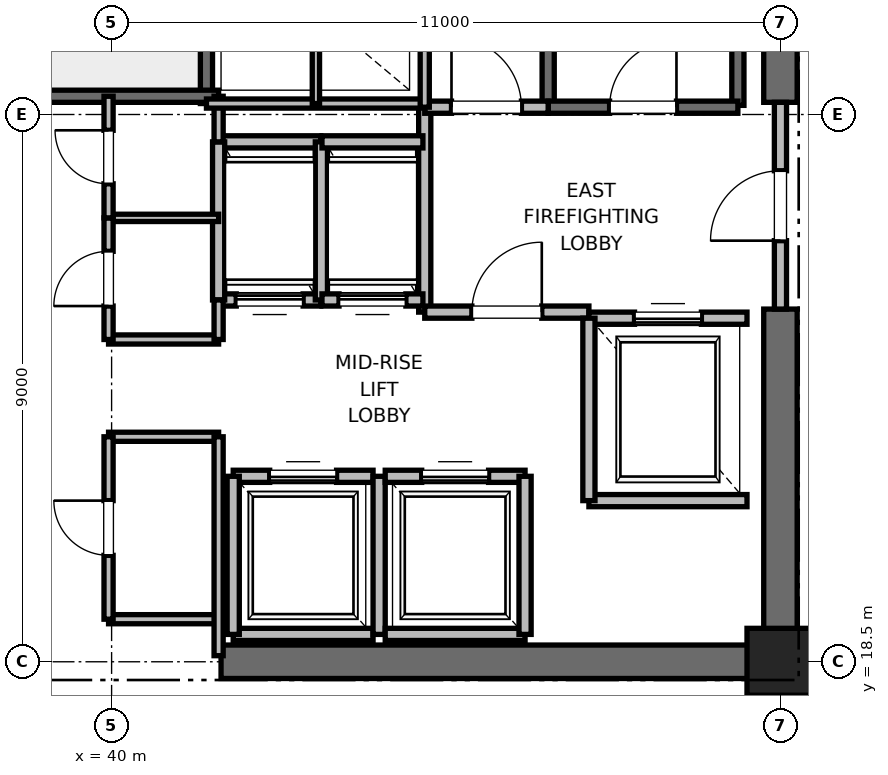
"""IFC4 building model, lengths in metres.
Left out: names, types, materials, properties, quantities, classifications, styles, units other than length and angle.
Written with IfcOpenShell. Run it as: python <this file> out.ifc"""

import sys

from ifc_helpers import new_model, si_unit, direction, frame, frame_2d, origin, origin_2d, place, context, subcontext, project, spatial, rectangle, extrude, element, fill, save


model = new_model("IFC4")
c1 = context("Model", 3, precision=1e-05, world=origin(), true_north=direction((0.0, 1.0)))
c2 = subcontext(c1, "Body", "Model", "MODEL_VIEW")
j1 = project(units=[si_unit("LENGTHUNIT", "METRE"), si_unit("PLANEANGLEUNIT", "RADIAN")], contexts=[c1])
p1 = place(None, origin())
s1 = spatial("IfcSite", under=j1, at=p1, CompositionType="ELEMENT")
p2 = place(p1, origin())
s2 = spatial("IfcBuilding", under=s1, at=p2, CompositionType="ELEMENT")
p3 = place(p2, frame((0.0, 0.0, 156.4)))
s3 = spatial("IfcBuildingStorey", under=s2, at=p3, CompositionType="ELEMENT", Elevation=156.4)
p4 = place(p3, frame((51.0, 18.5, 0.0), z_axis=(0.0, 0.0, 1.0), x_axis=(1.0, 0.0, 0.0)))
e1 = element("IfcColumn", 1, at=p4, inside=s3, PredefinedType="PILASTER", context=c2, shape_type="SweptSolid", body=[
    extrude(rectangle(XDim=1.1, YDim=1.1, at=origin_2d()), origin(), (0.0, 0.0, 1.0), 4.0),
])
p5 = place(p3, frame((41.8, 18.5, 0.0), z_axis=(0.0, 0.0, 1.0), x_axis=(1.0, 0.0, 0.0)))
e2 = element("IfcWall", 2, at=p5, inside=s3, PredefinedType="SHEAR", context=c2, shape_type="SweptSolid", body=[
    extrude(rectangle(XDim=9.2, YDim=0.55, at=frame_2d((4.6, 0.0))), origin(), (0.0, 0.0, 1.0), 3.775),
])
p6 = place(p3, frame((51.0, 18.5, 0.0), z_axis=(0.0, 0.0, 1.0), x_axis=(0.0, 1.0, 0.0)))
e3 = element("IfcWall", 3, at=p6, inside=s3, PredefinedType="SHEAR", context=c2, shape_type="SweptSolid", body=[
    extrude(rectangle(XDim=5.8, YDim=0.55, at=frame_2d((2.9, 0.0))), origin(), (0.0, 0.0, 1.0), 3.775),
])
p7 = place(p3, frame((51.0, 27.7, 0.0), z_axis=(0.0, 0.0, 1.0), x_axis=(0.0, 1.0, 0.0)))
e4 = element("IfcWall", 4, at=p7, inside=s3, PredefinedType="SHEAR", context=c2, shape_type="SweptSolid", body=[
    extrude(rectangle(XDim=8.8, YDim=0.55, at=frame_2d((4.4, 0.0))), origin(), (0.0, 0.0, 1.0), 3.775),
])
p8 = place(p3, frame((50.3, 27.65, 0.0), z_axis=(0.0, 0.0, 1.0), x_axis=(0.0, 1.0, 0.0)))
e5 = element("IfcWall", 5, at=p8, inside=s3, PredefinedType="SOLIDWALL", context=c2, shape_type="SweptSolid", body=[
    extrude(rectangle(XDim=8.15, YDim=0.2, at=frame_2d((4.075, 0.0))), origin(), (0.0, 0.0, 1.0), 3.775),
])
p9 = place(p3, frame((47.18, 27.62, 0.0), z_axis=(0.0, 0.0, 1.0), x_axis=(0.0, 1.0, 0.0)))
e6 = element("IfcWall", 6, at=p9, inside=s3, PredefinedType="SOLIDWALL", context=c2, shape_type="SweptSolid", body=[
    extrude(rectangle(XDim=8.18, YDim=0.2, at=frame_2d((4.09, 0.0))), origin(), (0.0, 0.0, 1.0), 3.775),
])
p10 = place(p3, frame((47.18, 27.62, 0.0), z_axis=(0.0, 0.0, 1.0), x_axis=(1.0, 0.0, 0.0)))
e7 = element("IfcWall", 7, at=p10, inside=s3, PredefinedType="SOLIDWALL", context=c2, shape_type="SweptSolid", body=[
    extrude(rectangle(XDim=3.12, YDim=0.2, at=frame_2d((1.56, 0.0))), origin(), (0.0, 0.0, 1.0), 3.775),
])
p11 = place(p10, frame((1.01, 0.0, 0.0)))
e8 = element("IfcOpeningElement", 8, at=p11, cuts=e7, PredefinedType="OPENING", context=c2, shape_type="SweptSolid", body=[
    extrude(rectangle(XDim=1.1, YDim=2.15, at=frame_2d((0.55, 1.075))), frame((0.0, 0.1, 0.0), z_axis=(0.0, -1.0, 0.0), x_axis=(1.0, 0.0, 0.0)), (0.0, 0.0, 1.0), 0.2),
])
p12 = place(p3, frame((41.56, 27.68, 0.0), z_axis=(0.0, 0.0, 1.0), x_axis=(0.0, 1.0, 0.0)))
e9 = element("IfcWall", 9, at=p12, inside=s3, PredefinedType="SOLIDWALL", context=c2, shape_type="SweptSolid", body=[
    extrude(rectangle(XDim=8.57, YDim=0.2, at=frame_2d((4.285, 0.0))), origin(), (0.0, 0.0, 1.0), 3.775),
])
p13 = place(p3, frame((38.44, 27.8, 0.0), z_axis=(0.0, 0.0, 1.0), x_axis=(1.0, 0.0, 0.0)))
e10 = element("IfcWall", 10, at=p13, inside=s3, PredefinedType="SOLIDWALL", context=c2, shape_type="SweptSolid", body=[
    extrude(rectangle(XDim=3.32, YDim=0.2, at=frame_2d((1.66, 0.0))), origin(), (0.0, 0.0, 1.0), 3.775),
])
p14 = place(p3, frame((45.15, 24.25, 0.0), z_axis=(0.0, 0.0, 1.0), x_axis=(0.0, 1.0, 0.0)))
e11 = element("IfcWall", 11, at=p14, inside=s3, PredefinedType="PARTITIONING", context=c2, shape_type="SweptSolid", body=[
    extrude(rectangle(XDim=3.37, YDim=0.2, at=frame_2d((1.685, 0.0))), origin(), (0.0, 0.0, 1.0), 3.775),
])
p15 = place(p3, frame((45.15, 24.25, 0.0), z_axis=(0.0, 0.0, 1.0), x_axis=(1.0, 0.0, 0.0)))
e12 = element("IfcWall", 12, at=p15, inside=s3, PredefinedType="PARTITIONING", context=c2, shape_type="SweptSolid", body=[
    extrude(rectangle(XDim=2.7, YDim=0.2, at=frame_2d((1.35, 0.0))), origin(), (0.0, 0.0, 1.0), 3.775),
])
p16 = place(p15, frame((0.775, 0.0, 0.0)))
e13 = element("IfcOpeningElement", 13, at=p16, cuts=e12, PredefinedType="OPENING", context=c2, shape_type="SweptSolid", body=[
    extrude(rectangle(XDim=1.15, YDim=2.2, at=frame_2d((0.575, 1.1))), frame((0.0, 0.1, 0.0), z_axis=(0.0, -1.0, 0.0), x_axis=(1.0, 0.0, 0.0)), (0.0, 0.0, 1.0), 0.2),
])
p17 = place(p3, frame((45.15, 27.62, 0.0), z_axis=(0.0, 0.0, 1.0), x_axis=(1.0, 0.0, 0.0)))
e14 = element("IfcWall", 14, at=p17, inside=s3, PredefinedType="PARTITIONING", context=c2, shape_type="SweptSolid", body=[
    extrude(rectangle(XDim=2.03, YDim=0.2, at=frame_2d((1.015, 0.0))), origin(), (0.0, 0.0, 1.0), 3.775),
])
p18 = place(p17, frame((0.44, 0.0, 0.0)))
e15 = element("IfcOpeningElement", 15, at=p18, cuts=e14, PredefinedType="OPENING", context=c2, shape_type="SweptSolid", body=[
    extrude(rectangle(XDim=1.15, YDim=2.2, at=frame_2d((0.575, 1.1))), frame((0.0, 0.1, 0.0), z_axis=(0.0, -1.0, 0.0), x_axis=(1.0, 0.0, 0.0)), (0.0, 0.0, 1.0), 0.2),
])
p19 = place(p3, frame((51.0, 24.3, 0.0), z_axis=(0.0, 0.0, 1.0), x_axis=(0.0, 1.0, 0.0)))
e16 = element("IfcWall", 16, at=p19, inside=s3, PredefinedType="PARTITIONING", context=c2, shape_type="SweptSolid", body=[
    extrude(rectangle(XDim=3.4, YDim=0.2, at=frame_2d((1.7, 0.0))), origin(), (0.0, 0.0, 1.0), 2.755),
])
p20 = place(p19, frame((1.125, 0.0, 0.0)))
e17 = element("IfcOpeningElement", 17, at=p20, cuts=e16, PredefinedType="OPENING", context=c2, shape_type="SweptSolid", body=[
    extrude(rectangle(XDim=1.15, YDim=2.2, at=frame_2d((0.575, 1.1))), frame((0.0, 0.1, 0.0), z_axis=(0.0, -1.0, 0.0), x_axis=(1.0, 0.0, 0.0)), (0.0, 0.0, 1.0), 0.2),
])
p21 = place(p3, frame((47.85, 21.15, 0.0), z_axis=(0.0, 0.0, 1.0), x_axis=(1.0, 0.0, 0.0)))
e18 = element("IfcWall", 18, at=p21, inside=s3, PredefinedType="SOLIDWALL", context=c2, shape_type="SweptSolid", body=[
    extrude(rectangle(XDim=2.6, YDim=0.2, at=frame_2d((1.3, 0.0))), origin(), (0.0, 0.0, 1.0), 3.775),
])
p22 = place(p3, frame((50.45, 24.15, 0.0), z_axis=(0.0, 0.0, 1.0), x_axis=(-1.0, 0.0, 0.0)))
e19 = element("IfcWall", 19, at=p22, inside=s3, PredefinedType="SOLIDWALL", context=c2, shape_type="SweptSolid", body=[
    extrude(rectangle(XDim=2.6, YDim=0.2, at=frame_2d((1.3, 0.0))), origin(), (0.0, 0.0, 1.0), 2.755),
])
p23 = place(p22, frame((0.75, 0.0, 0.0)))
e20 = element("IfcOpeningElement", 20, at=p23, cuts=e19, PredefinedType="OPENING", context=c2, shape_type="SweptSolid", body=[
    extrude(rectangle(XDim=1.1, YDim=2.2, at=frame_2d((0.55, 1.1))), frame((0.0, 0.1, 0.0), z_axis=(0.0, -1.0, 0.0), x_axis=(1.0, 0.0, 0.0)), (0.0, 0.0, 1.0), 0.2),
])
p24 = place(p3, frame((47.85, 24.15, 0.0), z_axis=(0.0, 0.0, 1.0), x_axis=(0.0, -1.0, 0.0)))
e21 = element("IfcWall", 21, at=p24, inside=s3, PredefinedType="SOLIDWALL", context=c2, shape_type="SweptSolid", body=[
    extrude(rectangle(XDim=3.0, YDim=0.2, at=frame_2d((1.5, 0.0))), origin(), (0.0, 0.0, 1.0), 3.775),
])
p25 = place(p3, frame((42.0, 18.95, 0.0), z_axis=(0.0, 0.0, 1.0), x_axis=(1.0, 0.0, 0.0)))
e22 = element("IfcWall", 22, at=p25, inside=s3, PredefinedType="SOLIDWALL", context=c2, shape_type="SweptSolid", body=[
    extrude(rectangle(XDim=2.3, YDim=0.2, at=frame_2d((1.15, 0.0))), origin(), (0.0, 0.0, 1.0), 2.755),
])
p26 = place(p3, frame((44.3, 21.55, 0.0), z_axis=(0.0, 0.0, 1.0), x_axis=(-1.0, 0.0, 0.0)))
e23 = element("IfcWall", 23, at=p26, inside=s3, PredefinedType="SOLIDWALL", context=c2, shape_type="SweptSolid", body=[
    extrude(rectangle(XDim=2.3, YDim=0.2, at=frame_2d((1.15, 0.0))), origin(), (0.0, 0.0, 1.0), 3.775),
])
p27 = place(p26, frame((0.6, 0.0, 0.0)))
e24 = element("IfcOpeningElement", 24, at=p27, cuts=e23, PredefinedType="OPENING", context=c2, shape_type="SweptSolid", body=[
    extrude(rectangle(XDim=1.1, YDim=2.2, at=frame_2d((0.55, 1.1))), frame((0.0, 0.1, 0.0), z_axis=(0.0, -1.0, 0.0), x_axis=(1.0, 0.0, 0.0)), (0.0, 0.0, 1.0), 0.2),
])
p28 = place(p3, frame((42.0, 21.55, 0.0), z_axis=(0.0, 0.0, 1.0), x_axis=(0.0, -1.0, 0.0)))
e25 = element("IfcWall", 25, at=p28, inside=s3, PredefinedType="SOLIDWALL", context=c2, shape_type="SweptSolid", body=[
    extrude(rectangle(XDim=2.6, YDim=0.2, at=frame_2d((1.3, 0.0))), origin(), (0.0, 0.0, 1.0), 2.755),
])
p29 = place(p3, frame((44.4, 18.95, 0.0), z_axis=(0.0, 0.0, 1.0), x_axis=(0.0, 1.0, 0.0)))
e26 = element("IfcWall", 26, at=p29, inside=s3, PredefinedType="SOLIDWALL", context=c2, shape_type="SweptSolid", body=[
    extrude(rectangle(XDim=2.6, YDim=0.2, at=frame_2d((1.3, 0.0))), origin(), (0.0, 0.0, 1.0), 3.775),
])
p30 = place(p3, frame((44.5, 18.95, 0.0), z_axis=(0.0, 0.0, 1.0), x_axis=(1.0, 0.0, 0.0)))
e27 = element("IfcWall", 27, at=p30, inside=s3, PredefinedType="SOLIDWALL", context=c2, shape_type="SweptSolid", body=[
    extrude(rectangle(XDim=2.3, YDim=0.2, at=frame_2d((1.15, 0.0))), origin(), (0.0, 0.0, 1.0), 3.775),
])
p31 = place(p3, frame((46.8, 21.55, 0.0), z_axis=(0.0, 0.0, 1.0), x_axis=(-1.0, 0.0, 0.0)))
e28 = element("IfcWall", 28, at=p31, inside=s3, PredefinedType="SOLIDWALL", context=c2, shape_type="SweptSolid", body=[
    extrude(rectangle(XDim=2.3, YDim=0.2, at=frame_2d((1.15, 0.0))), origin(), (0.0, 0.0, 1.0), 3.775),
])
p32 = place(p31, frame((0.6, 0.0, 0.0)))
e29 = element("IfcOpeningElement", 29, at=p32, cuts=e28, PredefinedType="OPENING", context=c2, shape_type="SweptSolid", body=[
    extrude(rectangle(XDim=1.1, YDim=2.2, at=frame_2d((0.55, 1.1))), frame((0.0, 0.1, 0.0), z_axis=(0.0, -1.0, 0.0), x_axis=(1.0, 0.0, 0.0)), (0.0, 0.0, 1.0), 0.2),
])
p33 = place(p3, frame((46.8, 18.95, 0.0), z_axis=(0.0, 0.0, 1.0), x_axis=(0.0, 1.0, 0.0)))
e30 = element("IfcWall", 30, at=p33, inside=s3, PredefinedType="SOLIDWALL", context=c2, shape_type="SweptSolid", body=[
    extrude(rectangle(XDim=2.6, YDim=0.2, at=frame_2d((1.3, 0.0))), origin(), (0.0, 0.0, 1.0), 3.775),
])
p34 = place(p3, frame((41.76, 24.45, 0.0), z_axis=(0.0, 0.0, 1.0), x_axis=(1.0, 0.0, 0.0)))
e31 = element("IfcWall", 31, at=p34, inside=s3, PredefinedType="SOLIDWALL", context=c2, shape_type="SweptSolid", body=[
    extrude(rectangle(XDim=1.68, YDim=0.2, at=frame_2d((0.84, 0.0))), origin(), (0.0, 0.0, 1.0), 3.775),
])
p35 = place(p34, frame((0.29, 0.0, 0.0)))
e32 = element("IfcOpeningElement", 32, at=p35, cuts=e31, PredefinedType="OPENING", context=c2, shape_type="SweptSolid", body=[
    extrude(rectangle(XDim=1.1, YDim=2.2, at=frame_2d((0.55, 1.1))), frame((0.0, 0.1, 0.0), z_axis=(0.0, -1.0, 0.0), x_axis=(1.0, 0.0, 0.0)), (0.0, 0.0, 1.0), 0.2),
])
p36 = place(p3, frame((43.44, 27.05, 0.0), z_axis=(0.0, 0.0, 1.0), x_axis=(-1.0, 0.0, 0.0)))
e33 = element("IfcWall", 33, at=p36, inside=s3, PredefinedType="SOLIDWALL", context=c2, shape_type="SweptSolid", body=[
    extrude(rectangle(XDim=1.68, YDim=0.2, at=frame_2d((0.84, 0.0))), origin(), (0.0, 0.0, 1.0), 3.775),
])
for number, where, z_axis, x_axis in (
    (34, (41.76, 27.05, 0.0), (0.0, 0.0, 1.0), (0.0, -1.0, 0.0)),
    (35, (43.45, 24.45, 0.0), (0.0, 0.0, 1.0), (0.0, 1.0, 0.0)),
):
    element("IfcWall", number, at=place(p3, frame(where, z_axis=z_axis, x_axis=x_axis)), inside=s3, PredefinedType="SOLIDWALL", context=c2, shape_type="SweptSolid", body=[
        extrude(rectangle(XDim=2.6, YDim=0.2, at=frame_2d((1.3, 0.0))), origin(), (0.0, 0.0, 1.0), 3.775),
    ])
p37 = place(p3, frame((43.46, 24.45, 0.0), z_axis=(0.0, 0.0, 1.0), x_axis=(1.0, 0.0, 0.0)))
e36 = element("IfcWall", 36, at=p37, inside=s3, PredefinedType="SOLIDWALL", context=c2, shape_type="SweptSolid", body=[
    extrude(rectangle(XDim=1.66, YDim=0.2, at=frame_2d((0.83, 0.0))), origin(), (0.0, 0.0, 1.0), 3.775),
])
p38 = place(p37, frame((0.28, 0.0, 0.0)))
e37 = element("IfcOpeningElement", 37, at=p38, cuts=e36, PredefinedType="OPENING", context=c2, shape_type="SweptSolid", body=[
    extrude(rectangle(XDim=1.1, YDim=2.2, at=frame_2d((0.55, 1.1))), frame((0.0, 0.1, 0.0), z_axis=(0.0, -1.0, 0.0), x_axis=(1.0, 0.0, 0.0)), (0.0, 0.0, 1.0), 0.2),
])
p39 = place(p3, frame((45.12, 27.05, 0.0), z_axis=(0.0, 0.0, 1.0), x_axis=(-1.0, 0.0, 0.0)))
e38 = element("IfcWall", 38, at=p39, inside=s3, PredefinedType="SOLIDWALL", context=c2, shape_type="SweptSolid", body=[
    extrude(rectangle(XDim=1.66, YDim=0.2, at=frame_2d((0.83, 0.0))), origin(), (0.0, 0.0, 1.0), 3.775),
])
for number, where, z_axis, x_axis in (
    (39, (39.95, 19.2, 0.0), (0.0, 0.0, 1.0), (1.0, 0.0, 0.0)),
    (40, (39.95, 22.2, 0.0), (0.0, 0.0, 1.0), (1.0, 0.0, 0.0)),
    (41, (39.95, 23.8, 0.0), (0.0, 0.0, 1.0), (1.0, 0.0, 0.0)),
):
    element("IfcWall", number, at=place(p3, frame(where, z_axis=z_axis, x_axis=x_axis)), inside=s3, PredefinedType="PARTITIONING", context=c2, shape_type="SweptSolid", body=[
        extrude(rectangle(XDim=1.81, YDim=0.15, at=frame_2d((0.905, 0.0))), origin(), (0.0, 0.0, 1.0), 2.85),
    ])
p40 = place(p3, frame((39.95, 25.8, 0.0), z_axis=(0.0, 0.0, 1.0), x_axis=(1.0, 0.0, 0.0)))
e42 = element("IfcWall", 42, at=p40, inside=s3, PredefinedType="PARTITIONING", context=c2, shape_type="SweptSolid", body=[
    extrude(rectangle(XDim=1.81, YDim=0.12, at=frame_2d((0.905, 0.0))), origin(), (0.0, 0.0, 1.0), 2.85),
])
p41 = place(p3, frame((41.76, 18.6, 0.0), z_axis=(0.0, 0.0, 1.0), x_axis=(0.0, 1.0, 0.0)))
e43 = element("IfcWall", 43, at=p41, inside=s3, PredefinedType="PARTITIONING", context=c2, shape_type="SweptSolid", body=[
    extrude(rectangle(XDim=3.6, YDim=0.15, at=frame_2d((1.8, 0.0))), origin(), (0.0, 0.0, 1.0), 2.755),
])
p42 = place(p3, frame((41.76, 23.8, 0.0), z_axis=(0.0, 0.0, 1.0), x_axis=(0.0, 1.0, 0.0)))
e44 = element("IfcWall", 44, at=p42, inside=s3, PredefinedType="PARTITIONING", context=c2, shape_type="SweptSolid", body=[
    extrude(rectangle(XDim=0.65, YDim=0.15, at=frame_2d((0.325, 0.0))), origin(), (0.0, 0.0, 1.0), 2.85),
])
p43 = place(p3, frame((41.76, 27.05, 0.0), z_axis=(0.0, 0.0, 1.0), x_axis=(0.0, 1.0, 0.0)))
e45 = element("IfcWall", 45, at=p43, inside=s3, PredefinedType="PARTITIONING", context=c2, shape_type="SweptSolid", body=[
    extrude(rectangle(XDim=0.75, YDim=0.15, at=frame_2d((0.375, 0.0))), origin(), (0.0, 0.0, 1.0), 2.85),
])
p44 = place(p3, frame((39.95, 19.2, 0.0), z_axis=(0.0, 0.0, 1.0), x_axis=(0.0, 1.0, 0.0)))
e46 = element("IfcWall", 46, at=p44, inside=s3, PredefinedType="PARTITIONING", context=c2, shape_type="SweptSolid", body=[
    extrude(rectangle(XDim=3.0, YDim=0.15, at=frame_2d((1.5, 0.0))), origin(), (0.0, 0.0, 1.0), 2.85),
])
p45 = place(p44, frame((1.05, 0.0, 0.0)))
e47 = element("IfcOpeningElement", 47, at=p45, cuts=e46, PredefinedType="OPENING", context=c2, shape_type="SweptSolid", body=[
    extrude(rectangle(XDim=0.9, YDim=2.1, at=frame_2d((0.45, 1.05))), frame((0.0, 0.075, 0.0), z_axis=(0.0, -1.0, 0.0), x_axis=(1.0, 0.0, 0.0)), (0.0, 0.0, 1.0), 0.15),
])
p46 = place(p3, frame((39.95, 23.8, 0.0), z_axis=(0.0, 0.0, 1.0), x_axis=(0.0, 1.0, 0.0)))
e48 = element("IfcWall", 48, at=p46, inside=s3, PredefinedType="PARTITIONING", context=c2, shape_type="SweptSolid", body=[
    extrude(rectangle(XDim=2.0, YDim=0.15, at=frame_2d((1.0, 0.0))), origin(), (0.0, 0.0, 1.0), 2.85),
])
p47 = place(p46, frame((0.55, 0.0, 0.0)))
e49 = element("IfcOpeningElement", 49, at=p47, cuts=e48, PredefinedType="OPENING", context=c2, shape_type="SweptSolid", body=[
    extrude(rectangle(XDim=0.9, YDim=2.1, at=frame_2d((0.45, 1.05))), frame((0.0, 0.075, 0.0), z_axis=(0.0, -1.0, 0.0), x_axis=(1.0, 0.0, 0.0)), (0.0, 0.0, 1.0), 0.15),
])
p48 = place(p3, frame((39.95, 25.8, 0.0), z_axis=(0.0, 0.0, 1.0), x_axis=(0.0, 1.0, 0.0)))
e50 = element("IfcWall", 50, at=p48, inside=s3, PredefinedType="PARTITIONING", context=c2, shape_type="SweptSolid", body=[
    extrude(rectangle(XDim=2.0, YDim=0.15, at=frame_2d((1.0, 0.0))), origin(), (0.0, 0.0, 1.0), 2.85),
])
p49 = place(p48, frame((0.56, 0.0, 0.0)))
e51 = element("IfcOpeningElement", 51, at=p49, cuts=e50, PredefinedType="OPENING", context=c2, shape_type="SweptSolid", body=[
    extrude(rectangle(XDim=0.88, YDim=2.1, at=frame_2d((0.44, 1.05))), frame((0.0, 0.075, 0.0), z_axis=(0.0, -1.0, 0.0), x_axis=(1.0, 0.0, 0.0)), (0.0, 0.0, 1.0), 0.15),
])
p50 = place(p3, frame((41.56, 27.68, 0.0), z_axis=(0.0, 0.0, 1.0), x_axis=(1.0, 0.0, 0.0)))
e52 = element("IfcWall", 52, at=p50, inside=s3, PredefinedType="PARTITIONING", context=c2, shape_type="SweptSolid", body=[
    extrude(rectangle(XDim=3.59, YDim=0.15, at=frame_2d((1.795, 0.0))), origin(), (0.0, 0.0, 1.0), 2.85),
])
p51 = place(p3, frame((45.15, 27.62, 0.0), z_axis=(0.0, 0.0, 1.0), x_axis=(0.0, 1.0, 0.0)))
e53 = element("IfcWall", 53, at=p51, inside=s3, PredefinedType="PARTITIONING", context=c2, shape_type="SweptSolid", body=[
    extrude(rectangle(XDim=3.1, YDim=0.15, at=frame_2d((1.55, 0.0))), origin(), (0.0, 0.0, 1.0), 2.85),
])
p52 = place(p3, frame((43.36, 27.68, 0.0), z_axis=(0.0, 0.0, 1.0), x_axis=(0.0, 1.0, 0.0)))
e54 = element("IfcWall", 54, at=p52, inside=s3, PredefinedType="PARTITIONING", context=c2, shape_type="SweptSolid", body=[
    extrude(rectangle(XDim=3.04, YDim=0.12, at=frame_2d((1.52, 0.0))), origin(), (0.0, 0.0, 1.0), 2.85),
])
p53 = place(p11, origin())
e55 = element("IfcDoor", 55, at=p53, inside=s3, OperationType="SINGLE_SWING_RIGHT", PredefinedType="DOOR", context=c2, shape_type="SweptSolid", body=[
    extrude(rectangle(XDim=1.1, YDim=2.15, at=frame_2d((0.55, 1.075))), frame((0.0, 0.025, 0.0), z_axis=(0.0, -1.0, 0.0), x_axis=(1.0, 0.0, 0.0)), (0.0, 0.0, 1.0), 0.05),
])
fill(e8, e55)
p54 = place(p16, origin())
e56 = element("IfcDoor", 56, at=p54, inside=s3, OperationType="SINGLE_SWING_RIGHT", PredefinedType="DOOR", context=c2, shape_type="SweptSolid", body=[
    extrude(rectangle(XDim=1.15, YDim=2.2, at=frame_2d((0.575, 1.1))), frame((0.0, 0.025, 0.0), z_axis=(0.0, -1.0, 0.0), x_axis=(1.0, 0.0, 0.0)), (0.0, 0.0, 1.0), 0.05),
])
fill(e13, e56)
p55 = place(p18, origin())
e57 = element("IfcDoor", 57, at=p55, inside=s3, OperationType="SINGLE_SWING_LEFT", PredefinedType="DOOR", context=c2, shape_type="SweptSolid", body=[
    extrude(rectangle(XDim=1.15, YDim=2.2, at=frame_2d((0.575, 1.1))), frame((0.0, 0.025, 0.0), z_axis=(0.0, -1.0, 0.0), x_axis=(1.0, 0.0, 0.0)), (0.0, 0.0, 1.0), 0.05),
])
fill(e15, e57)
p56 = place(p20, origin())
e58 = element("IfcDoor", 58, at=p56, inside=s3, OperationType="SINGLE_SWING_LEFT", PredefinedType="DOOR", context=c2, shape_type="SweptSolid", body=[
    extrude(rectangle(XDim=1.15, YDim=2.2, at=frame_2d((0.575, 1.1))), frame((0.0, 0.025, 0.0), z_axis=(0.0, -1.0, 0.0), x_axis=(1.0, 0.0, 0.0)), (0.0, 0.0, 1.0), 0.05),
])
fill(e17, e58)
p57 = place(p23, origin())
e59 = element("IfcDoor", 59, at=p57, inside=s3, OperationType="SLIDING_TO_RIGHT", PredefinedType="DOOR", context=c2, shape_type="SweptSolid", body=[
    extrude(rectangle(XDim=1.1, YDim=2.2, at=frame_2d((0.55, 1.1))), frame((0.0, 0.025, 0.0), z_axis=(0.0, -1.0, 0.0), x_axis=(1.0, 0.0, 0.0)), (0.0, 0.0, 1.0), 0.05),
])
fill(e20, e59)
p58 = place(p27, origin())
e60 = element("IfcDoor", 60, at=p58, inside=s3, OperationType="SLIDING_TO_RIGHT", PredefinedType="DOOR", context=c2, shape_type="SweptSolid", body=[
    extrude(rectangle(XDim=1.1, YDim=2.2, at=frame_2d((0.55, 1.1))), frame((0.0, 0.025, 0.0), z_axis=(0.0, -1.0, 0.0), x_axis=(1.0, 0.0, 0.0)), (0.0, 0.0, 1.0), 0.05),
])
fill(e24, e60)
p59 = place(p32, origin())
e61 = element("IfcDoor", 61, at=p59, inside=s3, OperationType="SLIDING_TO_RIGHT", PredefinedType="DOOR", context=c2, shape_type="SweptSolid", body=[
    extrude(rectangle(XDim=1.1, YDim=2.2, at=frame_2d((0.55, 1.1))), frame((0.0, 0.025, 0.0), z_axis=(0.0, -1.0, 0.0), x_axis=(1.0, 0.0, 0.0)), (0.0, 0.0, 1.0), 0.05),
])
fill(e29, e61)
p60 = place(p35, origin())
e62 = element("IfcDoor", 62, at=p60, inside=s3, OperationType="SLIDING_TO_RIGHT", PredefinedType="DOOR", context=c2, shape_type="SweptSolid", body=[
    extrude(rectangle(XDim=1.1, YDim=2.2, at=frame_2d((0.55, 1.1))), frame((0.0, 0.025, 0.0), z_axis=(0.0, -1.0, 0.0), x_axis=(1.0, 0.0, 0.0)), (0.0, 0.0, 1.0), 0.05),
])
fill(e32, e62)
p61 = place(p38, origin())
e63 = element("IfcDoor", 63, at=p61, inside=s3, OperationType="SLIDING_TO_RIGHT", PredefinedType="DOOR", context=c2, shape_type="SweptSolid", body=[
    extrude(rectangle(XDim=1.1, YDim=2.2, at=frame_2d((0.55, 1.1))), frame((0.0, 0.025, 0.0), z_axis=(0.0, -1.0, 0.0), x_axis=(1.0, 0.0, 0.0)), (0.0, 0.0, 1.0), 0.05),
])
fill(e37, e63)
p62 = place(p45, origin())
e64 = element("IfcDoor", 64, at=p62, inside=s3, OperationType="SINGLE_SWING_RIGHT", PredefinedType="DOOR", context=c2, shape_type="SweptSolid", body=[
    extrude(rectangle(XDim=0.9, YDim=2.1, at=frame_2d((0.45, 1.05))), frame((0.0, 0.025, 0.0), z_axis=(0.0, -1.0, 0.0), x_axis=(1.0, 0.0, 0.0)), (0.0, 0.0, 1.0), 0.05),
])
fill(e47, e64)
p63 = place(p47, origin())
e65 = element("IfcDoor", 65, at=p63, inside=s3, OperationType="SINGLE_SWING_LEFT", PredefinedType="DOOR", context=c2, shape_type="SweptSolid", body=[
    extrude(rectangle(XDim=0.9, YDim=2.1, at=frame_2d((0.45, 1.05))), frame((0.0, 0.025, 0.0), z_axis=(0.0, -1.0, 0.0), x_axis=(1.0, 0.0, 0.0)), (0.0, 0.0, 1.0), 0.05),
])
fill(e49, e65)
p64 = place(p49, origin())
e66 = element("IfcDoor", 66, at=p64, inside=s3, OperationType="SINGLE_SWING_RIGHT", PredefinedType="DOOR", context=c2, shape_type="SweptSolid", body=[
    extrude(rectangle(XDim=0.88, YDim=2.1, at=frame_2d((0.44, 1.05))), frame((0.0, 0.025, 0.0), z_axis=(0.0, -1.0, 0.0), x_axis=(1.0, 0.0, 0.0)), (0.0, 0.0, 1.0), 0.05),
])
fill(e51, e66)
save(model, sys.argv[1])
